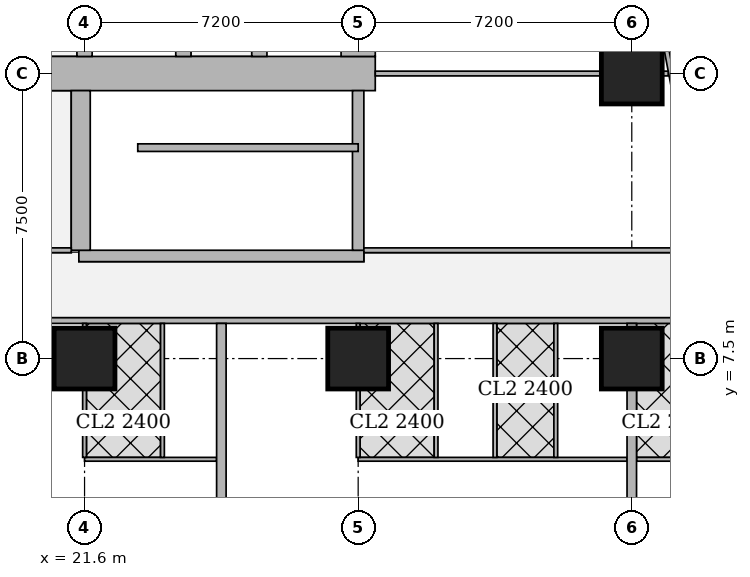
"""IFC4 building model, lengths in metres.
Left out: names, types, materials, properties, quantities, classifications, styles, units other than length and angle.
Written with IfcOpenShell. Run it as: python <this file> out.ifc"""

import sys

from ifc_helpers import new_model, si_unit, direction, frame, frame_2d, origin, origin_2d, place, context, subcontext, project, spatial, rectangle, extrude, element, fill, save


model = new_model("IFC4")
c1 = context("Model", 3, precision=1e-05, world=origin(), true_north=direction((0.0, 1.0)))
c2 = subcontext(c1, "Body", "Model", "MODEL_VIEW")
j1 = project(units=[si_unit("LENGTHUNIT", "METRE"), si_unit("PLANEANGLEUNIT", "RADIAN")], contexts=[c1])
p1 = place(None, origin())
s1 = spatial("IfcSite", under=j1, at=p1, CompositionType="ELEMENT")
p2 = place(p1, origin())
s2 = spatial("IfcBuilding", under=s1, at=p2, CompositionType="ELEMENT")
p3 = place(p2, frame((0.0, 0.0, 89.15)))
s3 = spatial("IfcBuildingStorey", under=s2, at=p3, CompositionType="ELEMENT", Elevation=89.15)
for number, where, z_axis, x_axis in (
    (1, (21.6, 7.5, 0.0), (0.0, 0.0, 1.0), (1.0, 0.0, 0.0)),
    (2, (28.8, 7.5, 0.0), (0.0, 0.0, 1.0), (1.0, 0.0, 0.0)),
    (3, (36.0, 7.5, 0.0), (0.0, 0.0, 1.0), (1.0, 0.0, 0.0)),
    (4, (36.0, 15.0, 0.0), (0.0, 0.0, 1.0), (1.0, 0.0, 0.0)),
):
    element("IfcColumn", number, at=place(p3, frame(where, z_axis=z_axis, x_axis=x_axis)), inside=s3, PredefinedType="COLUMN", context=c2, shape_type="SweptSolid", body=[
        extrude(rectangle(XDim=1.6, YDim=1.6, at=origin_2d()), origin(), (0.0, 0.0, 1.0), 3.75),
    ])
p4 = place(p3, frame((13.95, 15.0, 0.0), z_axis=(0.0, 0.0, 1.0), x_axis=(1.0, 0.0, 0.0)))
e5 = element("IfcWall", 5, at=p4, inside=s3, PredefinedType="SHEAR", context=c2, shape_type="SweptSolid", body=[
    extrude(rectangle(XDim=15.3, YDim=0.9, at=frame_2d((7.65, 0.0))), origin(), (0.0, 0.0, 1.0), 3.75),
])
p5 = place(p4, frame((4.45, 0.0, 0.0)))
e6 = element("IfcOpeningElement", 6, at=p5, cuts=e5, PredefinedType="OPENING", context=c2, shape_type="SweptSolid", body=[
    extrude(rectangle(XDim=1.8, YDim=2.1, at=frame_2d((0.9, 1.05))), frame((0.0, 0.46, 0.0), z_axis=(0.0, -1.0, 0.0), x_axis=(1.0, 0.0, 0.0)), (0.0, 0.0, 1.0), 0.92),
])
p6 = place(p4, frame((10.7, 0.0, 0.0)))
e7 = element("IfcOpeningElement", 7, at=p6, cuts=e5, PredefinedType="OPENING", context=c2, shape_type="SweptSolid", body=[
    extrude(rectangle(XDim=1.1, YDim=2.1, at=frame_2d((0.55, 1.05))), frame((0.0, 0.46, 0.0), z_axis=(0.0, -1.0, 0.0), x_axis=(1.0, 0.0, 0.0)), (0.0, 0.0, 1.0), 0.92),
])
p7 = place(p3, frame((28.8, 15.45, 0.0), z_axis=(0.0, 0.0, 1.0), x_axis=(0.0, 1.0, 0.0)))
e8 = element("IfcWall", 8, at=p7, inside=s3, PredefinedType="SHEAR", context=c2, shape_type="SweptSolid", body=[
    extrude(rectangle(XDim=14.1, YDim=0.9, at=frame_2d((7.05, 0.0))), origin(), (0.0, 0.0, 1.0), 3.75),
])
for number, where, z_axis, x_axis in (
    (9, (21.6, 15.45, 0.0), (0.0, 0.0, 1.0), (0.0, 1.0, 0.0)),
    (10, (24.2, 15.45, 0.0), (0.0, 0.0, 1.0), (0.0, 1.0, 0.0)),
):
    element("IfcWall", number, at=place(p3, frame(where, z_axis=z_axis, x_axis=x_axis)), inside=s3, PredefinedType="SHEAR", context=c2, shape_type="SweptSolid", body=[
        extrude(rectangle(XDim=14.1, YDim=0.4, at=frame_2d((7.05, 0.0))), origin(), (0.0, 0.0, 1.0), 3.75),
    ])
p8 = place(p3, frame((26.2, 15.45, 0.0), z_axis=(0.0, 0.0, 1.0), x_axis=(0.0, 1.0, 0.0)))
e11 = element("IfcWall", 11, at=p8, inside=s3, PredefinedType="SHEAR", context=c2, shape_type="SweptSolid", body=[
    extrude(rectangle(XDim=3.1, YDim=0.4, at=frame_2d((1.55, 0.0))), origin(), (0.0, 0.0, 1.0), 3.75),
])
p9 = place(p8, frame((0.825, 0.0, 0.0)))
e12 = element("IfcOpeningElement", 12, at=p9, cuts=e11, PredefinedType="OPENING", context=c2, shape_type="SweptSolid", body=[
    extrude(rectangle(XDim=1.2, YDim=2.1, at=frame_2d((0.6, 1.05))), frame((0.0, 0.21, 0.0), z_axis=(0.0, -1.0, 0.0), x_axis=(1.0, 0.0, 0.0)), (0.0, 0.0, 1.0), 0.42),
])
p10 = place(p3, frame((21.45, 10.2, 0.0), z_axis=(0.0, 0.0, 1.0), x_axis=(1.0, 0.0, 0.0)))
e13 = element("IfcWall", 13, at=p10, inside=s3, PredefinedType="SHEAR", context=c2, shape_type="SweptSolid", body=[
    extrude(rectangle(XDim=7.5, YDim=0.3, at=frame_2d((3.75, 0.0))), origin(), (0.0, 0.0, 1.0), 3.75),
])
p11 = place(p10, frame((0.5, 0.0, 0.0)))
e14 = element("IfcOpeningElement", 14, at=p11, cuts=e13, PredefinedType="OPENING", context=c2, shape_type="SweptSolid", body=[
    extrude(rectangle(XDim=1.1, YDim=2.1, at=frame_2d((0.55, 1.05))), frame((0.0, 0.16, 0.0), z_axis=(0.0, -1.0, 0.0), x_axis=(1.0, 0.0, 0.0)), (0.0, 0.0, 1.0), 0.32),
])
p12 = place(p3, frame((21.5, 10.35, 0.0), z_axis=(0.0, 0.0, 1.0), x_axis=(0.0, 1.0, 0.0)))
e15 = element("IfcWall", 15, at=p12, inside=s3, PredefinedType="SHEAR", context=c2, shape_type="SweptSolid", body=[
    extrude(rectangle(XDim=4.2, YDim=0.5, at=frame_2d((2.1, 0.0))), origin(), (0.0, 0.0, 1.0), 3.75),
])
p13 = place(p3, frame((28.8, 10.35, 0.0), z_axis=(0.0, 0.0, 1.0), x_axis=(0.0, 1.0, 0.0)))
e16 = element("IfcWall", 16, at=p13, inside=s3, PredefinedType="SHEAR", context=c2, shape_type="SweptSolid", body=[
    extrude(rectangle(XDim=4.2, YDim=0.3, at=frame_2d((2.1, 0.0))), origin(), (0.0, 0.0, 1.0), 3.75),
])
p14 = place(p3, frame((40.053, 8.5, 0.0), z_axis=(0.0, 0.0, 1.0), x_axis=(-1.0, 0.0, 0.0)))
e17 = element("IfcWall", 17, at=p14, inside=s3, PredefinedType="SOLIDWALL", context=c2, shape_type="SweptSolid", body=[
    extrude(rectangle(XDim=31.703, YDim=0.15, at=frame_2d((15.852, 0.0))), origin(), (0.0, 0.0, 1.0), 3.5),
])
p15 = place(p14, frame((28.103, 0.0, 0.0)))
e18 = element("IfcOpeningElement", 18, at=p15, cuts=e17, PredefinedType="OPENING", context=c2, shape_type="SweptSolid", body=[
    extrude(rectangle(XDim=1.0, YDim=2.1, at=frame_2d((0.5, 1.05))), frame((0.0, 0.085, 0.0), z_axis=(0.0, -1.0, 0.0), x_axis=(1.0, 0.0, 0.0)), (0.0, 0.0, 1.0), 0.17),
])
p16 = place(p14, frame((19.953, 0.0, 0.0)))
e19 = element("IfcOpeningElement", 19, at=p16, cuts=e17, PredefinedType="OPENING", context=c2, shape_type="SweptSolid", body=[
    extrude(rectangle(XDim=1.0, YDim=2.1, at=frame_2d((0.5, 1.05))), frame((0.0, 0.085, 0.0), z_axis=(0.0, -1.0, 0.0), x_axis=(1.0, 0.0, 0.0)), (0.0, 0.0, 1.0), 0.17),
])
p17 = place(p14, frame((12.753, 0.0, 0.0)))
e20 = element("IfcOpeningElement", 20, at=p17, cuts=e17, PredefinedType="OPENING", context=c2, shape_type="SweptSolid", body=[
    extrude(rectangle(XDim=1.0, YDim=2.1, at=frame_2d((0.5, 1.05))), frame((0.0, 0.085, 0.0), z_axis=(0.0, -1.0, 0.0), x_axis=(1.0, 0.0, 0.0)), (0.0, 0.0, 1.0), 0.17),
])
p18 = place(p14, frame((0.15, 0.0, 0.0)))
e21 = element("IfcOpeningElement", 21, at=p18, cuts=e17, PredefinedType="OPENING", context=c2, shape_type="SweptSolid", body=[
    extrude(rectangle(XDim=1.0, YDim=2.1, at=frame_2d((0.5, 1.05))), frame((0.0, 0.085, 0.0), z_axis=(0.0, -1.0, 0.0), x_axis=(1.0, 0.0, 0.0)), (0.0, 0.0, 1.0), 0.17),
])
p19 = place(p3, frame((33.127, 45.65, 0.0), z_axis=(0.0, 0.0, 1.0), x_axis=(0.185598547723, -0.98262565562, 0.0)))
e22 = element("IfcWall", 22, at=p19, inside=s3, PredefinedType="SOLIDWALL", context=c2, shape_type="SweptSolid", body=[
    extrude(rectangle(XDim=47.118, YDim=0.15, at=frame_2d((23.559, 0.0))), origin(), (0.0, 0.0, 1.0), 2.2),
])
p20 = place(p19, frame((15.285, 0.0, 0.0)))
e23 = element("IfcOpeningElement", 23, at=p20, cuts=e22, PredefinedType="OPENING", context=c2, shape_type="SweptSolid", body=[
    extrude(rectangle(XDim=1.0, YDim=2.1, at=frame_2d((0.5, 1.05))), frame((0.0, 0.085, 0.0), z_axis=(0.0, -1.0, 0.0), x_axis=(1.0, 0.0, 0.0)), (0.0, 0.0, 1.0), 0.17),
])
p21 = place(p19, frame((19.102, 0.0, 0.0)))
e24 = element("IfcOpeningElement", 24, at=p21, cuts=e22, PredefinedType="OPENING", context=c2, shape_type="SweptSolid", body=[
    extrude(rectangle(XDim=1.0, YDim=2.1, at=frame_2d((0.5, 1.05))), frame((0.0, 0.085, 0.0), z_axis=(0.0, -1.0, 0.0), x_axis=(1.0, 0.0, 0.0)), (0.0, 0.0, 1.0), 0.17),
])
p22 = place(p19, frame((33.88, 0.0, 0.0)))
e25 = element("IfcOpeningElement", 25, at=p22, cuts=e22, PredefinedType="OPENING", context=c2, shape_type="SweptSolid", body=[
    extrude(rectangle(XDim=1.0, YDim=2.1, at=frame_2d((0.5, 1.05))), frame((0.0, 0.085, 0.0), z_axis=(0.0, -1.0, 0.0), x_axis=(1.0, 0.0, 0.0)), (0.0, 0.0, 1.0), 0.17),
])
p23 = place(p3, frame((25.075, 4.85, 0.0), z_axis=(0.0, 0.0, 1.0), x_axis=(-1.0, 0.0, 0.0)))
e26 = element("IfcWall", 26, at=p23, inside=s3, PredefinedType="PARTITIONING", context=c2, shape_type="SweptSolid", body=[
    extrude(rectangle(XDim=3.475, YDim=0.1, at=frame_2d((1.737, 0.0))), origin(), (0.0, 0.0, 1.0), 3.5),
])
p24 = place(p23, frame((2.0, 0.0, 0.0)))
e27 = element("IfcOpeningElement", 27, at=p24, cuts=e26, PredefinedType="OPENING", context=c2, shape_type="SweptSolid", body=[
    extrude(rectangle(XDim=0.9, YDim=2.1, at=frame_2d((0.45, 1.05))), frame((0.0, 0.06, 0.0), z_axis=(0.0, -1.0, 0.0), x_axis=(1.0, 0.0, 0.0)), (0.0, 0.0, 1.0), 0.12),
])
p25 = place(p23, frame((0.2, 0.0, 0.0)))
e28 = element("IfcOpeningElement", 28, at=p25, cuts=e26, PredefinedType="OPENING", context=c2, shape_type="SweptSolid", body=[
    extrude(rectangle(XDim=0.9, YDim=2.1, at=frame_2d((0.45, 1.05))), frame((0.0, 0.06, 0.0), z_axis=(0.0, -1.0, 0.0), x_axis=(1.0, 0.0, 0.0)), (0.0, 0.0, 1.0), 0.12),
])
p26 = place(p3, frame((21.6, 4.9, 0.0), z_axis=(0.0, 0.0, 1.0), x_axis=(0.0, 1.0, 0.0)))
e29 = element("IfcWall", 29, at=p26, inside=s3, PredefinedType="PARTITIONING", context=c2, shape_type="SweptSolid", body=[
    extrude(rectangle(XDim=1.799, YDim=0.1, at=frame_2d((0.899, 0.0))), origin(), (0.0, 0.0, 1.0), 3.5),
])
p27 = place(p3, frame((21.6, 8.301, 0.0), z_axis=(0.0, 0.0, 1.0), x_axis=(0.0, 1.0, 0.0)))
e30 = element("IfcWall", 30, at=p27, inside=s3, PredefinedType="PARTITIONING", context=c2, shape_type="SweptSolid", body=[
    extrude(rectangle(XDim=0.124, YDim=0.1, at=frame_2d((0.062, 0.0))), origin(), (0.0, 0.0, 1.0), 3.5),
])
p28 = place(p3, frame((23.65, 4.9, 0.0), z_axis=(0.0, 0.0, 1.0), x_axis=(0.0, 1.0, 0.0)))
e31 = element("IfcWall", 31, at=p28, inside=s3, PredefinedType="PARTITIONING", context=c2, shape_type="SweptSolid", body=[
    extrude(rectangle(XDim=3.525, YDim=0.1, at=frame_2d((1.763, 0.0))), origin(), (0.0, 0.0, 1.0), 3.5),
])
p29 = place(p3, frame((35.875, 4.85, 0.0), z_axis=(0.0, 0.0, 1.0), x_axis=(-1.0, 0.0, 0.0)))
e32 = element("IfcWall", 32, at=p29, inside=s3, PredefinedType="PARTITIONING", context=c2, shape_type="SweptSolid", body=[
    extrude(rectangle(XDim=7.075, YDim=0.1, at=frame_2d((3.538, 0.0))), origin(), (0.0, 0.0, 1.0), 3.5),
])
p30 = place(p29, frame((5.6, 0.0, 0.0)))
e33 = element("IfcOpeningElement", 33, at=p30, cuts=e32, PredefinedType="OPENING", context=c2, shape_type="SweptSolid", body=[
    extrude(rectangle(XDim=0.9, YDim=2.1, at=frame_2d((0.45, 1.05))), frame((0.0, 0.06, 0.0), z_axis=(0.0, -1.0, 0.0), x_axis=(1.0, 0.0, 0.0)), (0.0, 0.0, 1.0), 0.12),
])
p31 = place(p29, frame((2.225, 0.0, 0.0)))
e34 = element("IfcOpeningElement", 34, at=p31, cuts=e32, PredefinedType="OPENING", context=c2, shape_type="SweptSolid", body=[
    extrude(rectangle(XDim=0.9, YDim=2.1, at=frame_2d((0.45, 1.05))), frame((0.0, 0.06, 0.0), z_axis=(0.0, -1.0, 0.0), x_axis=(1.0, 0.0, 0.0)), (0.0, 0.0, 1.0), 0.12),
])
p32 = place(p29, frame((3.8, 0.0, 0.0)))
e35 = element("IfcOpeningElement", 35, at=p32, cuts=e32, PredefinedType="OPENING", context=c2, shape_type="SweptSolid", body=[
    extrude(rectangle(XDim=0.9, YDim=2.1, at=frame_2d((0.45, 1.05))), frame((0.0, 0.06, 0.0), z_axis=(0.0, -1.0, 0.0), x_axis=(1.0, 0.0, 0.0)), (0.0, 0.0, 1.0), 0.12),
])
p33 = place(p29, frame((0.425, 0.0, 0.0)))
e36 = element("IfcOpeningElement", 36, at=p33, cuts=e32, PredefinedType="OPENING", context=c2, shape_type="SweptSolid", body=[
    extrude(rectangle(XDim=0.9, YDim=2.1, at=frame_2d((0.45, 1.05))), frame((0.0, 0.06, 0.0), z_axis=(0.0, -1.0, 0.0), x_axis=(1.0, 0.0, 0.0)), (0.0, 0.0, 1.0), 0.12),
])
p34 = place(p3, frame((28.8, 4.9, 0.0), z_axis=(0.0, 0.0, 1.0), x_axis=(0.0, 1.0, 0.0)))
e37 = element("IfcWall", 37, at=p34, inside=s3, PredefinedType="PARTITIONING", context=c2, shape_type="SweptSolid", body=[
    extrude(rectangle(XDim=1.799, YDim=0.1, at=frame_2d((0.899, 0.0))), origin(), (0.0, 0.0, 1.0), 3.5),
])
p35 = place(p3, frame((28.8, 8.301, 0.0), z_axis=(0.0, 0.0, 1.0), x_axis=(0.0, 1.0, 0.0)))
e38 = element("IfcWall", 38, at=p35, inside=s3, PredefinedType="PARTITIONING", context=c2, shape_type="SweptSolid", body=[
    extrude(rectangle(XDim=0.124, YDim=0.1, at=frame_2d((0.062, 0.0))), origin(), (0.0, 0.0, 1.0), 3.5),
])
for number, where, z_axis, x_axis in (
    (39, (32.4, 4.9, 0.0), (0.0, 0.0, 1.0), (0.0, 1.0, 0.0)),
    (40, (30.85, 4.9, 0.0), (0.0, 0.0, 1.0), (0.0, 1.0, 0.0)),
    (41, (34.0, 4.9, 0.0), (0.0, 0.0, 1.0), (0.0, 1.0, 0.0)),
):
    element("IfcWall", number, at=place(p3, frame(where, z_axis=z_axis, x_axis=x_axis)), inside=s3, PredefinedType="PARTITIONING", context=c2, shape_type="SweptSolid", body=[
        extrude(rectangle(XDim=3.525, YDim=0.1, at=frame_2d((1.763, 0.0))), origin(), (0.0, 0.0, 1.0), 3.5),
    ])
p36 = place(p3, frame((25.2, 3.65, 0.0), z_axis=(0.0, 0.0, 1.0), x_axis=(0.0, 1.0, 0.0)))
e42 = element("IfcWall", 42, at=p36, inside=s3, PredefinedType="SOLIDWALL", context=c2, shape_type="SweptSolid", body=[
    extrude(rectangle(XDim=4.775, YDim=0.25, at=frame_2d((2.388, 0.0))), origin(), (0.0, 0.0, 1.0), 3.5),
])
p37 = place(p3, frame((37.89, 4.85, 0.0), z_axis=(0.0, 0.0, 1.0), x_axis=(-1.0, 0.0, 0.0)))
e43 = element("IfcWall", 43, at=p37, inside=s3, PredefinedType="PARTITIONING", context=c2, shape_type="SweptSolid", body=[
    extrude(rectangle(XDim=1.765, YDim=0.1, at=frame_2d((0.882, 0.0))), origin(), (0.0, 0.0, 1.0), 3.5),
])
p38 = place(p37, frame((0.49, 0.0, 0.0)))
e44 = element("IfcOpeningElement", 44, at=p38, cuts=e43, PredefinedType="OPENING", context=c2, shape_type="SweptSolid", body=[
    extrude(rectangle(XDim=0.9, YDim=2.1, at=frame_2d((0.45, 1.05))), frame((0.0, 0.06, 0.0), z_axis=(0.0, -1.0, 0.0), x_axis=(1.0, 0.0, 0.0)), (0.0, 0.0, 1.0), 0.12),
])
p39 = place(p3, frame((36.0, 3.65, 0.0), z_axis=(0.0, 0.0, 1.0), x_axis=(0.0, 1.0, 0.0)))
e45 = element("IfcWall", 45, at=p39, inside=s3, PredefinedType="SOLIDWALL", context=c2, shape_type="SweptSolid", body=[
    extrude(rectangle(XDim=3.049, YDim=0.25, at=frame_2d((1.524, 0.0))), origin(), (0.0, 0.0, 1.0), 3.5),
])
p40 = place(p3, frame((36.0, 8.301, 0.0), z_axis=(0.0, 0.0, 1.0), x_axis=(0.0, 1.0, 0.0)))
e46 = element("IfcWall", 46, at=p40, inside=s3, PredefinedType="SOLIDWALL", context=c2, shape_type="SweptSolid", body=[
    extrude(rectangle(XDim=0.124, YDim=0.25, at=frame_2d((0.062, 0.0))), origin(), (0.0, 0.0, 1.0), 3.5),
])
p41 = place(p3, frame((10.413, 10.35, 0.0), z_axis=(0.0, 0.0, 1.0), x_axis=(1.0, 0.0, 0.0)))
e47 = element("IfcWall", 47, at=p41, inside=s3, PredefinedType="PARTITIONING", context=c2, shape_type="SweptSolid", body=[
    extrude(rectangle(XDim=10.837, YDim=0.125, at=frame_2d((5.418, 0.0))), origin(), (0.0, 0.0, 1.0), 3.5),
])
p42 = place(p41, frame((7.582, 0.0, 0.0)))
e48 = element("IfcOpeningElement", 48, at=p42, cuts=e47, PredefinedType="OPENING", context=c2, shape_type="SweptSolid", body=[
    extrude(rectangle(XDim=1.8, YDim=2.1, at=frame_2d((0.9, 1.05))), frame((0.0, 0.073, 0.0), z_axis=(0.0, -1.0, 0.0), x_axis=(1.0, 0.0, 0.0)), (0.0, 0.0, 1.0), 0.145),
])
p43 = place(p3, frame((28.95, 10.35, 0.0), z_axis=(0.0, 0.0, 1.0), x_axis=(1.0, 0.0, 0.0)))
e49 = element("IfcWall", 49, at=p43, inside=s3, PredefinedType="PARTITIONING", context=c2, shape_type="SweptSolid", body=[
    extrude(rectangle(XDim=8.886, YDim=0.125, at=frame_2d((4.443, 0.0))), origin(), (0.0, 0.0, 1.0), 3.5),
])
p44 = place(p3, frame((37.9, 10.413, 0.0), z_axis=(0.0, 0.0, 1.0), x_axis=(-0.185589740669, 0.982627319058, 0.0)))
e50 = element("IfcWall", 50, at=p44, inside=s3, PredefinedType="PARTITIONING", context=c2, shape_type="SweptSolid", body=[
    extrude(rectangle(XDim=24.602, YDim=0.125, at=frame_2d((12.301, 0.0))), origin(), (0.0, 0.0, 1.0), 2.5),
])
p45 = place(p44, frame((0.708, 0.0, 0.0)))
e51 = element("IfcOpeningElement", 51, at=p45, cuts=e50, PredefinedType="OPENING", context=c2, shape_type="SweptSolid", body=[
    extrude(rectangle(XDim=1.0, YDim=2.1, at=frame_2d((0.5, 1.05))), frame((0.0, 0.073, 0.0), z_axis=(0.0, -1.0, 0.0), x_axis=(1.0, 0.0, 0.0)), (0.0, 0.0, 1.0), 0.145),
])
p46 = place(p44, frame((5.75, 0.0, 0.0)))
e52 = element("IfcOpeningElement", 52, at=p46, cuts=e50, PredefinedType="OPENING", context=c2, shape_type="SweptSolid", body=[
    extrude(rectangle(XDim=1.0, YDim=2.1, at=frame_2d((0.5, 1.05))), frame((0.0, 0.073, 0.0), z_axis=(0.0, -1.0, 0.0), x_axis=(1.0, 0.0, 0.0)), (0.0, 0.0, 1.0), 0.145),
])
p47 = place(p44, frame((13.124, 0.0, 0.0)))
e53 = element("IfcOpeningElement", 53, at=p47, cuts=e50, PredefinedType="OPENING", context=c2, shape_type="SweptSolid", body=[
    extrude(rectangle(XDim=1.0, YDim=2.1, at=frame_2d((0.5, 1.05))), frame((0.0, 0.073, 0.0), z_axis=(0.0, -1.0, 0.0), x_axis=(1.0, 0.0, 0.0)), (0.0, 0.0, 1.0), 0.145),
])
p48 = place(p44, frame((16.94, 0.0, 0.0)))
e54 = element("IfcOpeningElement", 54, at=p48, cuts=e50, PredefinedType="OPENING", context=c2, shape_type="SweptSolid", body=[
    extrude(rectangle(XDim=1.0, YDim=2.1, at=frame_2d((0.5, 1.05))), frame((0.0, 0.073, 0.0), z_axis=(0.0, -1.0, 0.0), x_axis=(1.0, 0.0, 0.0)), (0.0, 0.0, 1.0), 0.145),
])
p49 = place(p44, frame((21.0, 0.0, 0.0)))
e55 = element("IfcOpeningElement", 55, at=p49, cuts=e50, PredefinedType="OPENING", context=c2, shape_type="SweptSolid", body=[
    extrude(rectangle(XDim=1.0, YDim=2.1, at=frame_2d((0.5, 1.05))), frame((0.0, 0.073, 0.0), z_axis=(0.0, -1.0, 0.0), x_axis=(1.0, 0.0, 0.0)), (0.0, 0.0, 1.0), 0.145),
])
p50 = place(p3, frame((29.25, 15.0, 0.0), z_axis=(0.0, 0.0, 1.0), x_axis=(1.0, 0.0, 0.0)))
e56 = element("IfcWall", 56, at=p50, inside=s3, PredefinedType="PARTITIONING", context=c2, shape_type="SweptSolid", body=[
    extrude(rectangle(XDim=5.949, YDim=0.125, at=frame_2d((2.975, 0.0))), origin(), (0.0, 0.0, 1.0), 3.5),
])
p51 = place(p3, frame((36.801, 15.0, 0.0), z_axis=(0.0, 0.0, 1.0), x_axis=(1.0, 0.0, 0.0)))
e57 = element("IfcWall", 57, at=p51, inside=s3, PredefinedType="PARTITIONING", context=c2, shape_type="SweptSolid", body=[
    extrude(rectangle(XDim=0.157, YDim=0.125, at=frame_2d((0.079, 0.0))), origin(), (0.0, 0.0, 1.0), 3.5),
])
p52 = place(p3, frame((23.0, 13.05, 0.0), z_axis=(0.0, 0.0, 1.0), x_axis=(1.0, 0.0, 0.0)))
e58 = element("IfcWall", 58, at=p52, inside=s3, PredefinedType="SHEAR", context=c2, shape_type="SweptSolid", body=[
    extrude(rectangle(XDim=5.8, YDim=0.2, at=frame_2d((2.9, 0.0))), origin(), (0.0, 0.0, 1.0), 3.75),
])
p53 = place(p24, origin())
e59 = element("IfcDoor", 59, at=p53, inside=s3, OperationType="SINGLE_SWING_LEFT", PredefinedType="DOOR", context=c2, shape_type="SweptSolid", body=[
    extrude(rectangle(XDim=0.9, YDim=2.1, at=frame_2d((0.45, 1.05))), frame((0.0, 0.025, 0.0), z_axis=(0.0, -1.0, 0.0), x_axis=(1.0, 0.0, 0.0)), (0.0, 0.0, 1.0), 0.05),
])
fill(e27, e59)
p54 = place(p25, origin())
e60 = element("IfcDoor", 60, at=p54, inside=s3, OperationType="SINGLE_SWING_RIGHT", PredefinedType="DOOR", context=c2, shape_type="SweptSolid", body=[
    extrude(rectangle(XDim=0.9, YDim=2.1, at=frame_2d((0.45, 1.05))), frame((0.0, 0.025, 0.0), z_axis=(0.0, -1.0, 0.0), x_axis=(1.0, 0.0, 0.0)), (0.0, 0.0, 1.0), 0.05),
])
fill(e28, e60)
p55 = place(p30, origin())
e61 = element("IfcDoor", 61, at=p55, inside=s3, OperationType="SINGLE_SWING_LEFT", PredefinedType="DOOR", context=c2, shape_type="SweptSolid", body=[
    extrude(rectangle(XDim=0.9, YDim=2.1, at=frame_2d((0.45, 1.05))), frame((0.0, 0.025, 0.0), z_axis=(0.0, -1.0, 0.0), x_axis=(1.0, 0.0, 0.0)), (0.0, 0.0, 1.0), 0.05),
])
fill(e33, e61)
p56 = place(p31, origin())
e62 = element("IfcDoor", 62, at=p56, inside=s3, OperationType="SINGLE_SWING_LEFT", PredefinedType="DOOR", context=c2, shape_type="SweptSolid", body=[
    extrude(rectangle(XDim=0.9, YDim=2.1, at=frame_2d((0.45, 1.05))), frame((0.0, 0.025, 0.0), z_axis=(0.0, -1.0, 0.0), x_axis=(1.0, 0.0, 0.0)), (0.0, 0.0, 1.0), 0.05),
])
fill(e34, e62)
p57 = place(p32, origin())
e63 = element("IfcDoor", 63, at=p57, inside=s3, OperationType="SINGLE_SWING_LEFT", PredefinedType="DOOR", context=c2, shape_type="SweptSolid", body=[
    extrude(rectangle(XDim=0.9, YDim=2.1, at=frame_2d((0.45, 1.05))), frame((0.0, 0.025, 0.0), z_axis=(0.0, -1.0, 0.0), x_axis=(1.0, 0.0, 0.0)), (0.0, 0.0, 1.0), 0.05),
])
fill(e35, e63)
p58 = place(p33, origin())
e64 = element("IfcDoor", 64, at=p58, inside=s3, OperationType="SINGLE_SWING_RIGHT", PredefinedType="DOOR", context=c2, shape_type="SweptSolid", body=[
    extrude(rectangle(XDim=0.9, YDim=2.1, at=frame_2d((0.45, 1.05))), frame((0.0, 0.025, 0.0), z_axis=(0.0, -1.0, 0.0), x_axis=(1.0, 0.0, 0.0)), (0.0, 0.0, 1.0), 0.05),
])
fill(e36, e64)
p59 = place(p17, origin())
e65 = element("IfcDoor", 65, at=p59, inside=s3, OperationType="SINGLE_SWING_RIGHT", PredefinedType="DOOR", context=c2, shape_type="SweptSolid", body=[
    extrude(rectangle(XDim=1.0, YDim=2.1, at=frame_2d((0.5, 1.05))), frame((0.0, 0.025, 0.0), z_axis=(0.0, -1.0, 0.0), x_axis=(1.0, 0.0, 0.0)), (0.0, 0.0, 1.0), 0.05),
])
fill(e20, e65)
p60 = place(p38, origin())
e66 = element("IfcDoor", 66, at=p60, inside=s3, OperationType="SINGLE_SWING_LEFT", PredefinedType="DOOR", context=c2, shape_type="SweptSolid", body=[
    extrude(rectangle(XDim=0.9, YDim=2.1, at=frame_2d((0.45, 1.05))), frame((0.0, 0.025, 0.0), z_axis=(0.0, -1.0, 0.0), x_axis=(1.0, 0.0, 0.0)), (0.0, 0.0, 1.0), 0.05),
])
fill(e44, e66)
p61 = place(p6, origin())
e67 = element("IfcDoor", 67, at=p61, inside=s3, OperationType="SINGLE_SWING_LEFT", PredefinedType="DOOR", context=c2, shape_type="SweptSolid", body=[
    extrude(rectangle(XDim=1.1, YDim=2.1, at=frame_2d((0.55, 1.05))), frame((0.0, 0.025, 0.0), z_axis=(0.0, -1.0, 0.0), x_axis=(1.0, 0.0, 0.0)), (0.0, 0.0, 1.0), 0.05),
])
fill(e7, e67)
p62 = place(p11, origin())
e68 = element("IfcDoor", 68, at=p62, inside=s3, OperationType="SINGLE_SWING_LEFT", PredefinedType="DOOR", context=c2, shape_type="SweptSolid", body=[
    extrude(rectangle(XDim=1.1, YDim=2.1, at=frame_2d((0.55, 1.05))), frame((0.0, 0.025, 0.0), z_axis=(0.0, -1.0, 0.0), x_axis=(1.0, 0.0, 0.0)), (0.0, 0.0, 1.0), 0.05),
])
fill(e14, e68)
save(model, sys.argv[1])
